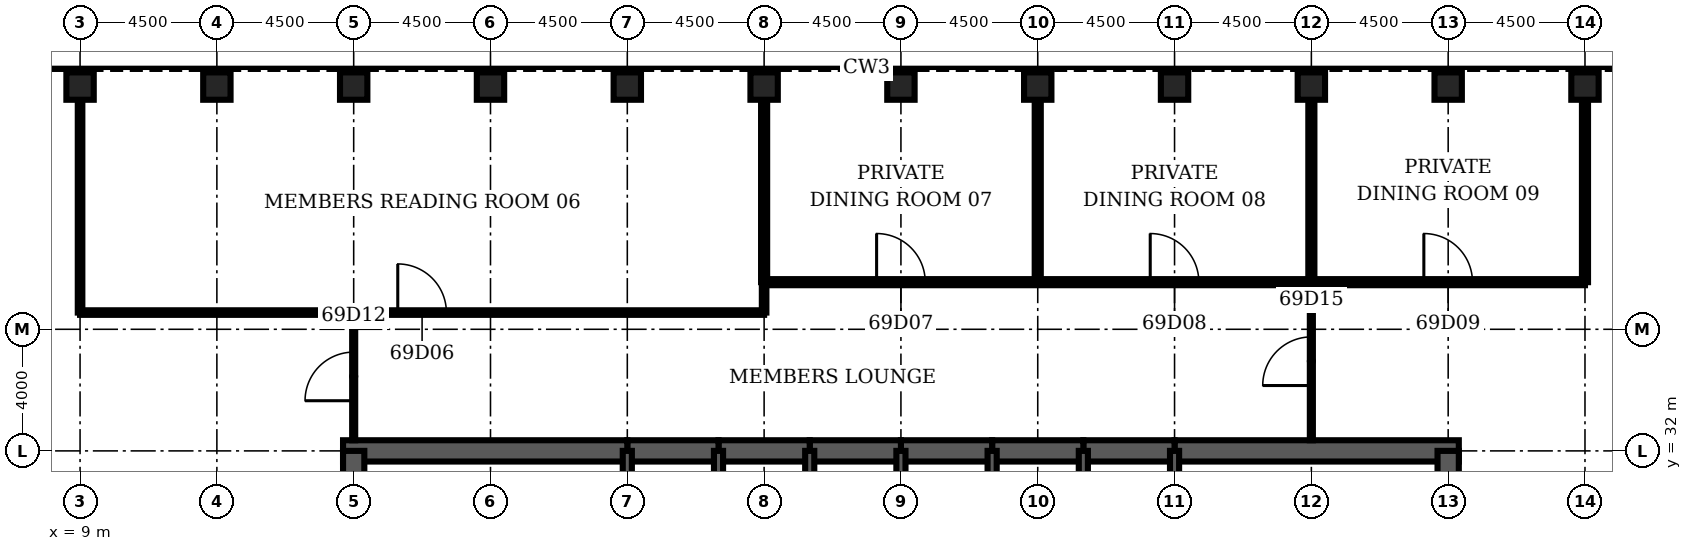
"""IFC4 building model, lengths in metres.
Left out: names, types, materials, properties, quantities, classifications, styles, units other than length and angle.
Written with IfcOpenShell. Run it as: python <this file> out.ifc"""

import sys

from ifc_helpers import new_model, si_unit, direction, frame, frame_2d, origin, origin_2d, place, context, subcontext, project, spatial, rectangle, hollow_rectangle, extrude, element, fill, save


model = new_model("IFC4")
c1 = context("Model", 3, precision=1e-05, world=origin(), true_north=direction((0.0, 1.0)))
c2 = subcontext(c1, "Body", "Model", "MODEL_VIEW")
j1 = project(units=[si_unit("LENGTHUNIT", "METRE"), si_unit("PLANEANGLEUNIT", "RADIAN")], contexts=[c1])
p1 = place(None, origin())
s1 = spatial("IfcSite", under=j1, at=p1, CompositionType="ELEMENT")
p2 = place(p1, origin())
s2 = spatial("IfcBuilding", under=s1, at=p2, CompositionType="ELEMENT")
p3 = place(p2, frame((0.0, 0.0, 304.7)))
s3 = spatial("IfcBuildingStorey", under=s2, at=p3, CompositionType="ELEMENT", Elevation=304.7)
for number, where, z_axis, x_axis in (
    (1, (58.5, 44.0, 0.0), (0.0, 0.0, 1.0), (0.0, 1.0, 0.0)),
    (2, (54.0, 44.0, 0.0), (0.0, 0.0, 1.0), (0.0, 1.0, 0.0)),
    (3, (49.5, 44.0, 0.0), (0.0, 0.0, 1.0), (0.0, 1.0, 0.0)),
    (4, (45.0, 44.0, 0.0), (0.0, 0.0, 1.0), (0.0, 1.0, 0.0)),
    (5, (40.5, 44.0, 0.0), (0.0, 0.0, 1.0), (0.0, 1.0, 0.0)),
    (6, (36.0, 44.0, 0.0), (0.0, 0.0, 1.0), (0.0, 1.0, 0.0)),
    (7, (31.5, 44.0, 0.0), (0.0, 0.0, 1.0), (0.0, 1.0, 0.0)),
    (8, (27.0, 44.0, 0.0), (0.0, 0.0, 1.0), (0.0, 1.0, 0.0)),
    (9, (22.5, 44.0, 0.0), (0.0, 0.0, 1.0), (0.0, 1.0, 0.0)),
    (10, (18.0, 44.0, 0.0), (0.0, 0.0, 1.0), (0.0, 1.0, 0.0)),
    (11, (13.5, 44.0, 0.0), (0.0, 0.0, 1.0), (0.0, 1.0, 0.0)),
    (12, (9.0, 44.0, 0.0), (0.0, 0.0, 1.0), (0.0, 1.0, 0.0)),
):
    element("IfcColumn", number, at=place(p3, frame(where, z_axis=z_axis, x_axis=x_axis)), inside=s3, PredefinedType="COLUMN", context=c2, shape_type="SweptSolid", body=[
        extrude(hollow_rectangle(XDim=0.9, YDim=0.9, WallThickness=0.06, at=origin_2d()), origin(), (0.0, 0.0, 1.0), 4.2),
    ])
p4 = place(p3, frame((54.35, 32.0, 0.0), z_axis=(0.0, 0.0, 1.0), x_axis=(-1.0, 0.0, 0.0)))
e13 = element("IfcWall", 13, at=p4, inside=s3, PredefinedType="SHEAR", context=c2, shape_type="SweptSolid", body=[
    extrude(rectangle(XDim=9.35, YDim=0.7, at=frame_2d((4.675, 0.0))), origin(), (0.0, 0.0, 1.0), 4.2),
])
for number, where, z_axis, x_axis in (
    (14, (45.0, 32.0, 0.0), (0.0, 0.0, 1.0), (-1.0, 0.0, 0.0)),
    (15, (42.0, 32.0, 0.0), (0.0, 0.0, 1.0), (-1.0, 0.0, 0.0)),
    (16, (39.0, 32.0, 0.0), (0.0, 0.0, 1.0), (-1.0, 0.0, 0.0)),
    (17, (36.0, 32.0, 0.0), (0.0, 0.0, 1.0), (-1.0, 0.0, 0.0)),
    (18, (33.0, 32.0, 0.0), (0.0, 0.0, 1.0), (-1.0, 0.0, 0.0)),
    (19, (30.0, 32.0, 0.0), (0.0, 0.0, 1.0), (-1.0, 0.0, 0.0)),
):
    element("IfcWall", number, at=place(p3, frame(where, z_axis=z_axis, x_axis=x_axis)), inside=s3, PredefinedType="SHEAR", context=c2, shape_type="SweptSolid", body=[
        extrude(rectangle(XDim=3.0, YDim=0.7, at=frame_2d((1.5, 0.0))), origin(), (0.0, 0.0, 1.0), 4.2),
    ])
p5 = place(p3, frame((27.0, 32.0, 0.0), z_axis=(0.0, 0.0, 1.0), x_axis=(-1.0, 0.0, 0.0)))
e20 = element("IfcWall", 20, at=p5, inside=s3, PredefinedType="SHEAR", context=c2, shape_type="SweptSolid", body=[
    extrude(rectangle(XDim=9.35, YDim=0.7, at=frame_2d((4.675, 0.0))), origin(), (0.0, 0.0, 1.0), 4.2),
])
for number, where, z_axis, x_axis in (
    (21, (18.0, 32.0, 0.0), (0.0, 0.0, 1.0), (0.0, -1.0, 0.0)),
    (22, (54.0, 28.8, 0.0), (0.0, 0.0, 1.0), (0.0, 1.0, 0.0)),
):
    element("IfcWall", number, at=place(p3, frame(where, z_axis=z_axis, x_axis=x_axis)), inside=s3, PredefinedType="SHEAR", context=c2, shape_type="SweptSolid", body=[
        extrude(rectangle(XDim=3.2, YDim=0.7, at=frame_2d((1.6, 0.0))), origin(), (0.0, 0.0, 1.0), 4.2),
    ])
for number, where, z_axis, x_axis in (
    (23, (27.0, 28.8, 0.0), (0.0, 0.0, 1.0), (0.0, 1.0, 0.0)),
    (24, (30.0, 28.8, 0.0), (0.0, 0.0, 1.0), (0.0, 1.0, 0.0)),
    (25, (33.0, 28.8, 0.0), (0.0, 0.0, 1.0), (0.0, 1.0, 0.0)),
    (26, (36.0, 28.8, 0.0), (0.0, 0.0, 1.0), (0.0, 1.0, 0.0)),
    (27, (39.0, 28.8, 0.0), (0.0, 0.0, 1.0), (0.0, 1.0, 0.0)),
    (28, (42.0, 28.8, 0.0), (0.0, 0.0, 1.0), (0.0, 1.0, 0.0)),
    (29, (45.0, 28.8, 0.0), (0.0, 0.0, 1.0), (0.0, 1.0, 0.0)),
):
    element("IfcWall", number, at=place(p3, frame(where, z_axis=z_axis, x_axis=x_axis)), inside=s3, PredefinedType="SOLIDWALL", context=c2, shape_type="SweptSolid", body=[
        extrude(rectangle(XDim=3.2, YDim=0.3, at=frame_2d((1.6, 0.0))), origin(), (0.0, 0.0, 1.0), 4.2),
    ])
p6 = place(p3, frame((9.0, 36.55, 0.0), z_axis=(0.0, 0.0, 1.0), x_axis=(1.0, 0.0, 0.0)))
e30 = element("IfcWall", 30, at=p6, inside=s3, PredefinedType="PARTITIONING", context=c2, shape_type="SweptSolid", body=[
    extrude(rectangle(XDim=22.5, YDim=0.15, at=frame_2d((11.25, 0.0))), origin(), (0.0, 0.0, 1.0), 3.0),
])
p7 = place(p6, frame((10.45, 0.0, 0.0)))
e31 = element("IfcOpeningElement", 31, at=p7, cuts=e30, PredefinedType="OPENING", context=c2, shape_type="SweptSolid", body=[
    extrude(rectangle(XDim=1.6, YDim=2.1, at=frame_2d((0.8, 1.05))), frame((0.0, 0.085, 0.0), z_axis=(0.0, -1.0, 0.0), x_axis=(1.0, 0.0, 0.0)), (0.0, 0.0, 1.0), 0.17),
])
p8 = place(p3, frame((31.5, 37.55, 0.0), z_axis=(0.0, 0.0, 1.0), x_axis=(1.0, 0.0, 0.0)))
e32 = element("IfcWall", 32, at=p8, inside=s3, PredefinedType="PARTITIONING", context=c2, shape_type="SweptSolid", body=[
    extrude(rectangle(XDim=27.0, YDim=0.2, at=frame_2d((13.5, 0.0))), origin(), (0.0, 0.0, 1.0), 3.0),
])
p9 = place(p8, frame((3.7, 0.0, 0.0)))
e33 = element("IfcOpeningElement", 33, at=p9, cuts=e32, PredefinedType="OPENING", context=c2, shape_type="SweptSolid", body=[
    extrude(rectangle(XDim=1.6, YDim=2.1, at=frame_2d((0.8, 1.05))), frame((0.0, 0.11, 0.0), z_axis=(0.0, -1.0, 0.0), x_axis=(1.0, 0.0, 0.0)), (0.0, 0.0, 1.0), 0.22),
])
p10 = place(p8, frame((12.7, 0.0, 0.0)))
e34 = element("IfcOpeningElement", 34, at=p10, cuts=e32, PredefinedType="OPENING", context=c2, shape_type="SweptSolid", body=[
    extrude(rectangle(XDim=1.6, YDim=2.1, at=frame_2d((0.8, 1.05))), frame((0.0, 0.11, 0.0), z_axis=(0.0, -1.0, 0.0), x_axis=(1.0, 0.0, 0.0)), (0.0, 0.0, 1.0), 0.22),
])
p11 = place(p8, frame((21.7, 0.0, 0.0)))
e35 = element("IfcOpeningElement", 35, at=p11, cuts=e32, PredefinedType="OPENING", context=c2, shape_type="SweptSolid", body=[
    extrude(rectangle(XDim=1.6, YDim=2.1, at=frame_2d((0.8, 1.05))), frame((0.0, 0.11, 0.0), z_axis=(0.0, -1.0, 0.0), x_axis=(1.0, 0.0, 0.0)), (0.0, 0.0, 1.0), 0.22),
])
p12 = place(p3, frame((9.0, 36.55, 0.0), z_axis=(0.0, 0.0, 1.0), x_axis=(0.0, 1.0, 0.0)))
e36 = element("IfcWall", 36, at=p12, inside=s3, PredefinedType="PARTITIONING", context=c2, shape_type="SweptSolid", body=[
    extrude(rectangle(XDim=7.0, YDim=0.15, at=frame_2d((3.5, 0.0))), origin(), (0.0, 0.0, 1.0), 3.0),
])
p13 = place(p3, frame((18.0, 32.35, 0.0), z_axis=(0.0, 0.0, 1.0), x_axis=(0.0, 1.0, 0.0)))
e37 = element("IfcWall", 37, at=p13, inside=s3, PredefinedType="PARTITIONING", context=c2, shape_type="SweptSolid", body=[
    extrude(rectangle(XDim=4.2, YDim=0.1, at=frame_2d((2.1, 0.0))), origin(), (0.0, 0.0, 1.0), 3.0),
])
p14 = place(p13, frame((1.3, 0.0, 0.0)))
e38 = element("IfcOpeningElement", 38, at=p14, cuts=e37, PredefinedType="OPENING", context=c2, shape_type="SweptSolid", body=[
    extrude(rectangle(XDim=1.6, YDim=2.1, at=frame_2d((0.8, 1.05))), frame((0.0, 0.06, 0.0), z_axis=(0.0, -1.0, 0.0), x_axis=(1.0, 0.0, 0.0)), (0.0, 0.0, 1.0), 0.12),
])
p15 = place(p3, frame((31.5, 36.55, 0.0), z_axis=(0.0, 0.0, 1.0), x_axis=(0.0, 1.0, 0.0)))
e39 = element("IfcWall", 39, at=p15, inside=s3, PredefinedType="PARTITIONING", context=c2, shape_type="SweptSolid", body=[
    extrude(rectangle(XDim=1.0, YDim=0.15, at=frame_2d((0.5, 0.0))), origin(), (0.0, 0.0, 1.0), 3.0),
])
for number, where, z_axis, x_axis in (
    (40, (31.5, 37.55, 0.0), (0.0, 0.0, 1.0), (0.0, 1.0, 0.0)),
    (41, (40.5, 37.55, 0.0), (0.0, 0.0, 1.0), (0.0, 1.0, 0.0)),
):
    element("IfcWall", number, at=place(p3, frame(where, z_axis=z_axis, x_axis=x_axis)), inside=s3, PredefinedType="PARTITIONING", context=c2, shape_type="SweptSolid", body=[
        extrude(rectangle(XDim=6.0, YDim=0.2, at=frame_2d((3.0, 0.0))), origin(), (0.0, 0.0, 1.0), 3.0),
    ])
p16 = place(p3, frame((49.5, 32.35, 0.0), z_axis=(0.0, 0.0, 1.0), x_axis=(0.0, 1.0, 0.0)))
e42 = element("IfcWall", 42, at=p16, inside=s3, PredefinedType="PARTITIONING", context=c2, shape_type="SweptSolid", body=[
    extrude(rectangle(XDim=5.2, YDim=0.1, at=frame_2d((2.6, 0.0))), origin(), (0.0, 0.0, 1.0), 3.0),
])
p17 = place(p16, frame((1.8, 0.0, 0.0)))
e43 = element("IfcOpeningElement", 43, at=p17, cuts=e42, PredefinedType="OPENING", context=c2, shape_type="SweptSolid", body=[
    extrude(rectangle(XDim=1.6, YDim=2.1, at=frame_2d((0.8, 1.05))), frame((0.0, 0.06, 0.0), z_axis=(0.0, -1.0, 0.0), x_axis=(1.0, 0.0, 0.0)), (0.0, 0.0, 1.0), 0.12),
])
for number, where, z_axis, x_axis in (
    (44, (49.5, 37.55, 0.0), (0.0, 0.0, 1.0), (0.0, 1.0, 0.0)),
    (45, (58.5, 37.55, 0.0), (0.0, 0.0, 1.0), (0.0, 1.0, 0.0)),
):
    element("IfcWall", number, at=place(p3, frame(where, z_axis=z_axis, x_axis=x_axis)), inside=s3, PredefinedType="PARTITIONING", context=c2, shape_type="SweptSolid", body=[
        extrude(rectangle(XDim=6.0, YDim=0.2, at=frame_2d((3.0, 0.0))), origin(), (0.0, 0.0, 1.0), 3.0),
    ])
p18 = place(p7, origin())
e46 = element("IfcDoor", 46, at=p18, inside=s3, OperationType="SINGLE_SWING_LEFT", PredefinedType="DOOR", context=c2, shape_type="SweptSolid", body=[
    extrude(rectangle(XDim=1.6, YDim=2.1, at=frame_2d((0.8, 1.05))), frame((0.0, 0.025, 0.0), z_axis=(0.0, -1.0, 0.0), x_axis=(1.0, 0.0, 0.0)), (0.0, 0.0, 1.0), 0.05),
])
fill(e31, e46)
p19 = place(p9, origin())
e47 = element("IfcDoor", 47, at=p19, inside=s3, OperationType="SINGLE_SWING_LEFT", PredefinedType="DOOR", context=c2, shape_type="SweptSolid", body=[
    extrude(rectangle(XDim=1.6, YDim=2.1, at=frame_2d((0.8, 1.05))), frame((0.0, 0.025, 0.0), z_axis=(0.0, -1.0, 0.0), x_axis=(1.0, 0.0, 0.0)), (0.0, 0.0, 1.0), 0.05),
])
fill(e33, e47)
p20 = place(p10, origin())
e48 = element("IfcDoor", 48, at=p20, inside=s3, OperationType="SINGLE_SWING_LEFT", PredefinedType="DOOR", context=c2, shape_type="SweptSolid", body=[
    extrude(rectangle(XDim=1.6, YDim=2.1, at=frame_2d((0.8, 1.05))), frame((0.0, 0.025, 0.0), z_axis=(0.0, -1.0, 0.0), x_axis=(1.0, 0.0, 0.0)), (0.0, 0.0, 1.0), 0.05),
])
fill(e34, e48)
p21 = place(p11, origin())
e49 = element("IfcDoor", 49, at=p21, inside=s3, OperationType="SINGLE_SWING_LEFT", PredefinedType="DOOR", context=c2, shape_type="SweptSolid", body=[
    extrude(rectangle(XDim=1.6, YDim=2.1, at=frame_2d((0.8, 1.05))), frame((0.0, 0.025, 0.0), z_axis=(0.0, -1.0, 0.0), x_axis=(1.0, 0.0, 0.0)), (0.0, 0.0, 1.0), 0.05),
])
fill(e35, e49)
p22 = place(p14, origin())
e50 = element("IfcDoor", 50, at=p22, inside=s3, OperationType="SINGLE_SWING_LEFT", PredefinedType="DOOR", context=c2, shape_type="SweptSolid", body=[
    extrude(rectangle(XDim=1.6, YDim=2.1, at=frame_2d((0.8, 1.05))), frame((0.0, 0.025, 0.0), z_axis=(0.0, -1.0, 0.0), x_axis=(1.0, 0.0, 0.0)), (0.0, 0.0, 1.0), 0.05),
])
fill(e38, e50)
p23 = place(p17, origin())
e51 = element("IfcDoor", 51, at=p23, inside=s3, OperationType="SINGLE_SWING_LEFT", PredefinedType="DOOR", context=c2, shape_type="SweptSolid", body=[
    extrude(rectangle(XDim=1.6, YDim=2.1, at=frame_2d((0.8, 1.05))), frame((0.0, 0.025, 0.0), z_axis=(0.0, -1.0, 0.0), x_axis=(1.0, 0.0, 0.0)), (0.0, 0.0, 1.0), 0.05),
])
fill(e43, e51)
save(model, sys.argv[1])
